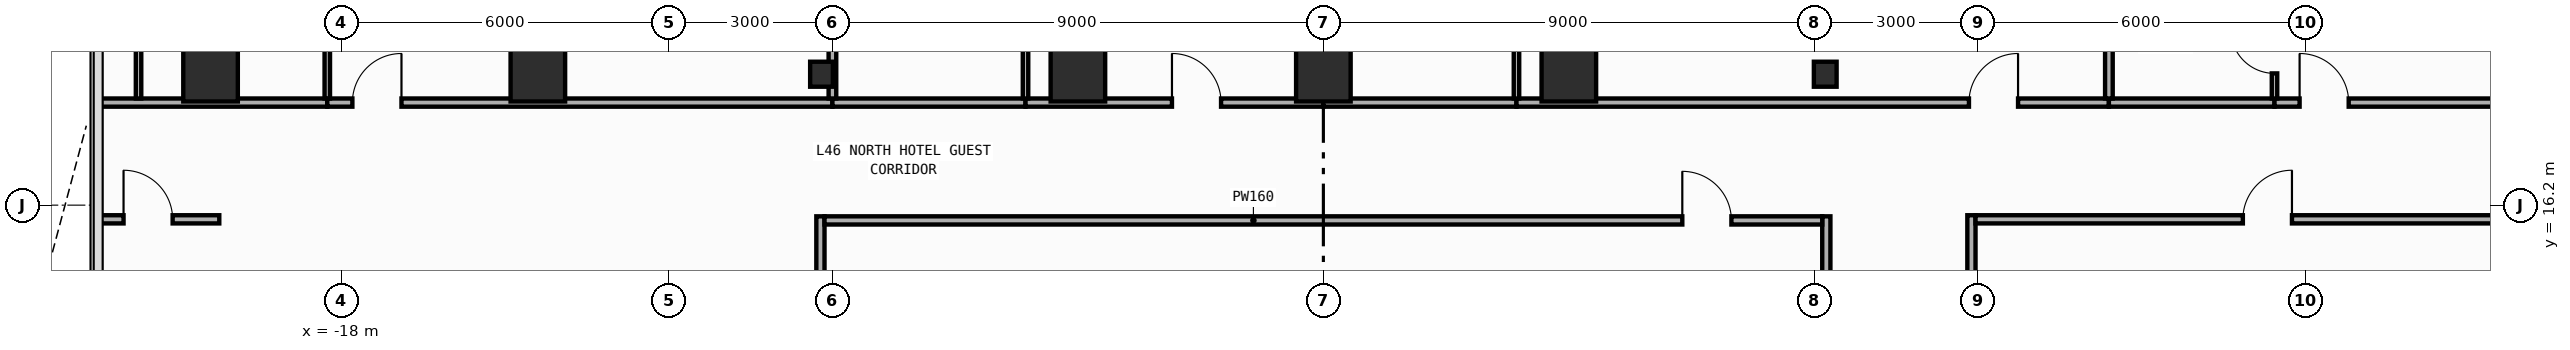
"""IFC4 building model, lengths in metres.
Left out: names, types, materials, properties, quantities, classifications, styles, units other than length and angle.
Written with IfcOpenShell. Run it as: python <this file> out.ifc"""

import sys

from ifc_helpers import new_model, si_unit, direction, frame, frame_2d, origin, origin_2d, place, context, subcontext, project, spatial, rectangle, i_section, extrude, element, fill, save


model = new_model("IFC4")
c1 = context("Model", 3, precision=1e-05, world=origin(), true_north=direction((0.0, 1.0)))
c2 = subcontext(c1, "Body", "Model", "MODEL_VIEW")
j1 = project(units=[si_unit("LENGTHUNIT", "METRE"), si_unit("PLANEANGLEUNIT", "RADIAN")], contexts=[c1])
p1 = place(None, origin())
s1 = spatial("IfcSite", under=j1, at=p1, CompositionType="ELEMENT")
p2 = place(p1, origin())
s2 = spatial("IfcBuilding", under=s1, at=p2, CompositionType="ELEMENT")
p3 = place(p2, frame((0.0, 0.0, 199.2)))
s3 = spatial("IfcBuildingStorey", under=s2, at=p3, CompositionType="ELEMENT", Elevation=199.2)
for number, where, z_axis, x_axis in (
    (1, (-9.2, 18.6, 0.0), (0.0, 0.0, 1.0), (1.0, 0.0, 0.0)),
    (2, (9.2, 18.6, 0.0), (0.0, 0.0, 1.0), (1.0, 0.0, 0.0)),
):
    element("IfcColumn", number, at=place(p3, frame(where, z_axis=z_axis, x_axis=x_axis)), inside=s3, PredefinedType="COLUMN", context=c2, shape_type="SweptSolid", body=[
        extrude(i_section(OverallWidth=0.417, OverallDepth=0.458, WebThickness=0.03, FlangeThickness=0.05, FilletRadius=0.022, at=origin_2d()), origin(), (0.0, 0.0, 1.0), 3.8),
    ])
for number, where, z_axis, x_axis in (
    (3, (-20.4, 18.6, 0.0), (0.0, 0.0, 1.0), (1.0, 0.0, 0.0)),
    (4, (-14.4, 18.6, 0.0), (0.0, 0.0, 1.0), (1.0, 0.0, 0.0)),
    (5, (-4.5, 18.6, 0.0), (0.0, 0.0, 1.0), (1.0, 0.0, 0.0)),
    (6, (0.0, 18.6, 0.0), (0.0, 0.0, 1.0), (1.0, 0.0, 0.0)),
    (7, (4.5, 18.6, 0.0), (0.0, 0.0, 1.0), (1.0, 0.0, 0.0)),
):
    element("IfcColumn", number, at=place(p3, frame(where, z_axis=z_axis, x_axis=x_axis)), inside=s3, PredefinedType="COLUMN", context=c2, shape_type="SweptSolid", body=[
        extrude(rectangle(XDim=1.0, YDim=1.0, at=origin_2d()), origin(), (0.0, 0.0, 1.0), 3.8),
    ])
p4 = place(p3, frame((-9.22, -1.8, 0.0), z_axis=(0.0, 0.0, 1.0), x_axis=(0.0, 1.0, 0.0)))
e8 = element("IfcWall", 8, at=p4, inside=s3, PredefinedType="PARTITIONING", context=c2, shape_type="SweptSolid", body=[
    extrude(rectangle(XDim=17.795, YDim=0.15, at=frame_2d((8.897, 0.0))), origin(), (0.0, 0.0, 1.0), 2.952),
])
p5 = place(p4, frame((6.729, 0.0, 0.0)))
e9 = element("IfcOpeningElement", 9, at=p5, cuts=e8, PredefinedType="OPENING", context=c2, shape_type="SweptSolid", body=[
    extrude(rectangle(XDim=0.9, YDim=2.15, at=frame_2d((0.45, 1.075))), frame((0.0, 0.085, 0.0), z_axis=(0.0, -1.0, 0.0), x_axis=(1.0, 0.0, 0.0)), (0.0, 0.0, 1.0), 0.17),
])
p6 = place(p3, frame((9.22, -1.8, 0.0), z_axis=(0.0, 0.0, 1.0), x_axis=(0.0, 1.0, 0.0)))
e10 = element("IfcWall", 10, at=p6, inside=s3, PredefinedType="PARTITIONING", context=c2, shape_type="SweptSolid", body=[
    extrude(rectangle(XDim=17.795, YDim=0.15, at=frame_2d((8.897, 0.0))), origin(), (0.0, 0.0, 1.0), 2.952),
])
p7 = place(p6, frame((6.729, 0.0, 0.0)))
e11 = element("IfcOpeningElement", 11, at=p7, cuts=e10, PredefinedType="OPENING", context=c2, shape_type="SweptSolid", body=[
    extrude(rectangle(XDim=0.9, YDim=2.15, at=frame_2d((0.45, 1.075))), frame((0.0, 0.085, 0.0), z_axis=(0.0, -1.0, 0.0), x_axis=(1.0, 0.0, 0.0)), (0.0, 0.0, 1.0), 0.17),
])
p8 = place(p3, frame((11.88, 7.16, 0.0), z_axis=(0.0, 0.0, 1.0), x_axis=(0.0, 1.0, 0.0)))
e12 = element("IfcWall", 12, at=p8, inside=s3, PredefinedType="PARTITIONING", context=c2, shape_type="SweptSolid", body=[
    extrude(rectangle(XDim=8.855, YDim=0.15, at=frame_2d((4.427, 0.0))), origin(), (0.0, 0.0, 1.0), 3.54),
])
p9 = place(p8, frame((0.46, 0.0, 0.0)))
e13 = element("IfcOpeningElement", 13, at=p9, cuts=e12, PredefinedType="OPENING", context=c2, shape_type="SweptSolid", body=[
    extrude(rectangle(XDim=0.9, YDim=2.15, at=frame_2d((0.45, 1.075))), frame((0.0, 0.085, 0.0), z_axis=(0.0, -1.0, 0.0), x_axis=(1.0, 0.0, 0.0)), (0.0, 0.0, 1.0), 0.17),
])
p10 = place(p3, frame((-9.145, 15.92, 0.0), z_axis=(0.0, 0.0, 1.0), x_axis=(1.0, 0.0, 0.0)))
e14 = element("IfcWall", 14, at=p10, inside=s3, PredefinedType="PARTITIONING", context=c2, shape_type="SweptSolid", body=[
    extrude(rectangle(XDim=18.29, YDim=0.15, at=frame_2d((9.145, 0.0))), origin(), (0.0, 0.0, 1.0), 3.54),
])
p11 = place(p10, frame((15.725, 0.0, 0.0)))
e15 = element("IfcOpeningElement", 15, at=p11, cuts=e14, PredefinedType="OPENING", context=c2, shape_type="SweptSolid", body=[
    extrude(rectangle(XDim=0.9, YDim=2.15, at=frame_2d((0.45, 1.075))), frame((0.0, 0.085, 0.0), z_axis=(0.0, -1.0, 0.0), x_axis=(1.0, 0.0, 0.0)), (0.0, 0.0, 1.0), 0.17),
])
p12 = place(p3, frame((-22.455, 18.08, 0.0), z_axis=(0.0, 0.0, 1.0), x_axis=(1.0, 0.0, 0.0)))
e16 = element("IfcWall", 16, at=p12, inside=s3, PredefinedType="PARTITIONING", context=c2, shape_type="SweptSolid", body=[
    extrude(rectangle(XDim=4.195, YDim=0.15, at=frame_2d((2.098, 0.0))), origin(), (0.0, 0.0, 1.0), 3.54),
])
p13 = place(p3, frame((-18.26, 18.08, 0.0), z_axis=(0.0, 0.0, 1.0), x_axis=(1.0, 0.0, 0.0)))
e17 = element("IfcWall", 17, at=p13, inside=s3, PredefinedType="PARTITIONING", context=c2, shape_type="SweptSolid", body=[
    extrude(rectangle(XDim=9.26, YDim=0.15, at=frame_2d((4.63, 0.0))), origin(), (0.0, 0.0, 1.0), 3.54),
])
p14 = place(p13, frame((0.46, 0.0, 0.0)))
e18 = element("IfcOpeningElement", 18, at=p14, cuts=e17, PredefinedType="OPENING", context=c2, shape_type="SweptSolid", body=[
    extrude(rectangle(XDim=0.9, YDim=2.15, at=frame_2d((0.45, 1.075))), frame((0.0, 0.085, 0.0), z_axis=(0.0, -1.0, 0.0), x_axis=(1.0, 0.0, 0.0)), (0.0, 0.0, 1.0), 0.17),
])
p15 = place(p3, frame((-9.0, 18.08, 0.0), z_axis=(0.0, 0.0, 1.0), x_axis=(1.0, 0.0, 0.0)))
e19 = element("IfcWall", 19, at=p15, inside=s3, PredefinedType="PARTITIONING", context=c2, shape_type="SweptSolid", body=[
    extrude(rectangle(XDim=3.54, YDim=0.15, at=frame_2d((1.77, 0.0))), origin(), (0.0, 0.0, 1.0), 3.54),
])
p16 = place(p3, frame((-5.46, 18.08, 0.0), z_axis=(0.0, 0.0, 1.0), x_axis=(1.0, 0.0, 0.0)))
e20 = element("IfcWall", 20, at=p16, inside=s3, PredefinedType="PARTITIONING", context=c2, shape_type="SweptSolid", body=[
    extrude(rectangle(XDim=5.46, YDim=0.15, at=frame_2d((2.73, 0.0))), origin(), (0.0, 0.0, 1.0), 3.54),
])
p17 = place(p16, frame((2.684, 0.0, 0.0)))
e21 = element("IfcOpeningElement", 21, at=p17, cuts=e20, PredefinedType="OPENING", context=c2, shape_type="SweptSolid", body=[
    extrude(rectangle(XDim=0.9, YDim=2.15, at=frame_2d((0.45, 1.075))), frame((0.0, 0.085, 0.0), z_axis=(0.0, -1.0, 0.0), x_axis=(1.0, 0.0, 0.0)), (0.0, 0.0, 1.0), 0.17),
])
p18 = place(p3, frame((0.0, 18.08, 0.0), z_axis=(0.0, 0.0, 1.0), x_axis=(1.0, 0.0, 0.0)))
e22 = element("IfcWall", 22, at=p18, inside=s3, PredefinedType="PARTITIONING", context=c2, shape_type="SweptSolid", body=[
    extrude(rectangle(XDim=3.54, YDim=0.15, at=frame_2d((1.77, 0.0))), origin(), (0.0, 0.0, 1.0), 3.54),
])
p19 = place(p3, frame((3.54, 18.08, 0.0), z_axis=(0.0, 0.0, 1.0), x_axis=(1.0, 0.0, 0.0)))
e23 = element("IfcWall", 23, at=p19, inside=s3, PredefinedType="PARTITIONING", context=c2, shape_type="SweptSolid", body=[
    extrude(rectangle(XDim=10.86, YDim=0.15, at=frame_2d((5.43, 0.0))), origin(), (0.0, 0.0, 1.0), 3.54),
])
p20 = place(p19, frame((8.295, 0.0, 0.0)))
e24 = element("IfcOpeningElement", 24, at=p20, cuts=e23, PredefinedType="OPENING", context=c2, shape_type="SweptSolid", body=[
    extrude(rectangle(XDim=0.9, YDim=2.15, at=frame_2d((0.45, 1.075))), frame((0.0, 0.085, 0.0), z_axis=(0.0, -1.0, 0.0), x_axis=(1.0, 0.0, 0.0)), (0.0, 0.0, 1.0), 0.17),
])
p21 = place(p3, frame((14.4, 18.08, 0.0), z_axis=(0.0, 0.0, 1.0), x_axis=(1.0, 0.0, 0.0)))
e25 = element("IfcWall", 25, at=p21, inside=s3, PredefinedType="PARTITIONING", context=c2, shape_type="SweptSolid", body=[
    extrude(rectangle(XDim=3.036, YDim=0.15, at=frame_2d((1.518, 0.0))), origin(), (0.0, 0.0, 1.0), 3.54),
])
p22 = place(p3, frame((17.436, 18.08, 0.0), z_axis=(0.0, 0.0, 1.0), x_axis=(1.0, 0.0, 0.0)))
e26 = element("IfcWall", 26, at=p22, inside=s3, PredefinedType="PARTITIONING", context=c2, shape_type="SweptSolid", body=[
    extrude(rectangle(XDim=5.019, YDim=0.15, at=frame_2d((2.51, 0.0))), origin(), (0.0, 0.0, 1.0), 3.54),
])
p23 = place(p22, frame((0.46, 0.0, 0.0)))
e27 = element("IfcOpeningElement", 27, at=p23, cuts=e26, PredefinedType="OPENING", context=c2, shape_type="SweptSolid", body=[
    extrude(rectangle(XDim=0.9, YDim=2.15, at=frame_2d((0.45, 1.075))), frame((0.0, 0.085, 0.0), z_axis=(0.0, -1.0, 0.0), x_axis=(1.0, 0.0, 0.0)), (0.0, 0.0, 1.0), 0.17),
])
p24 = place(p3, frame((11.955, 15.94, 0.0), z_axis=(0.0, 0.0, 1.0), x_axis=(1.0, 0.0, 0.0)))
e28 = element("IfcWall", 28, at=p24, inside=s3, PredefinedType="PARTITIONING", context=c2, shape_type="SweptSolid", body=[
    extrude(rectangle(XDim=10.5, YDim=0.15, at=frame_2d((5.25, 0.0))), origin(), (0.0, 0.0, 1.0), 3.54),
])
p25 = place(p24, frame((4.901, 0.0, 0.0)))
e29 = element("IfcOpeningElement", 29, at=p25, cuts=e28, PredefinedType="OPENING", context=c2, shape_type="SweptSolid", body=[
    extrude(rectangle(XDim=0.9, YDim=2.15, at=frame_2d((0.45, 1.075))), frame((0.0, 0.085, 0.0), z_axis=(0.0, -1.0, 0.0), x_axis=(1.0, 0.0, 0.0)), (0.0, 0.0, 1.0), 0.17),
])
p26 = place(p3, frame((-22.455, 15.94, 0.0), z_axis=(0.0, 0.0, 1.0), x_axis=(1.0, 0.0, 0.0)))
e30 = element("IfcWall", 30, at=p26, inside=s3, PredefinedType="PARTITIONING", context=c2, shape_type="SweptSolid", body=[
    extrude(rectangle(XDim=2.215, YDim=0.15, at=frame_2d((1.107, 0.0))), origin(), (0.0, 0.0, 1.0), 3.54),
])
p27 = place(p26, frame((0.46, 0.0, 0.0)))
e31 = element("IfcOpeningElement", 31, at=p27, cuts=e30, PredefinedType="OPENING", context=c2, shape_type="SweptSolid", body=[
    extrude(rectangle(XDim=0.9, YDim=2.15, at=frame_2d((0.45, 1.075))), frame((0.0, 0.085, 0.0), z_axis=(0.0, -1.0, 0.0), x_axis=(1.0, 0.0, 0.0)), (0.0, 0.0, 1.0), 0.17),
])
p28 = place(p3, frame((-18.26, 18.155, 0.0), z_axis=(0.0, 0.0, 1.0), x_axis=(0.0, 1.0, 0.0)))
e32 = element("IfcWall", 32, at=p28, inside=s3, PredefinedType="PARTITIONING", context=c2, shape_type="SweptSolid", body=[
    extrude(rectangle(XDim=2.965, YDim=0.1, at=frame_2d((1.482, 0.0))), origin(), (0.0, 0.0, 1.0), 3.54),
])
p29 = place(p28, frame((1.705, 0.0, 0.0)))
e33 = element("IfcOpeningElement", 33, at=p29, cuts=e32, PredefinedType="OPENING", context=c2, shape_type="SweptSolid", body=[
    extrude(rectangle(XDim=0.8, YDim=2.1, at=frame_2d((0.4, 1.05))), frame((0.0, 0.06, 0.0), z_axis=(0.0, -1.0, 0.0), x_axis=(1.0, 0.0, 0.0)), (0.0, 0.0, 1.0), 0.12),
])
p30 = place(p3, frame((-9.0, 18.155, 0.0), z_axis=(0.0, 0.0, 1.0), x_axis=(0.0, 1.0, 0.0)))
e34 = element("IfcWall", 34, at=p30, inside=s3, PredefinedType="PARTITIONING", context=c2, shape_type="SweptSolid", body=[
    extrude(rectangle(XDim=3.015, YDim=0.14, at=frame_2d((1.507, 0.0))), origin(), (0.0, 0.0, 1.0), 2.952),
])
p31 = place(p3, frame((-5.46, 18.155, 0.0), z_axis=(0.0, 0.0, 1.0), x_axis=(0.0, 1.0, 0.0)))
e35 = element("IfcWall", 35, at=p31, inside=s3, PredefinedType="PARTITIONING", context=c2, shape_type="SweptSolid", body=[
    extrude(rectangle(XDim=2.965, YDim=0.1, at=frame_2d((1.482, 0.0))), origin(), (0.0, 0.0, 1.0), 3.54),
])
p32 = place(p31, frame((1.705, 0.0, 0.0)))
e36 = element("IfcOpeningElement", 36, at=p32, cuts=e35, PredefinedType="OPENING", context=c2, shape_type="SweptSolid", body=[
    extrude(rectangle(XDim=0.8, YDim=2.1, at=frame_2d((0.4, 1.05))), frame((0.0, 0.06, 0.0), z_axis=(0.0, -1.0, 0.0), x_axis=(1.0, 0.0, 0.0)), (0.0, 0.0, 1.0), 0.12),
])
p33 = place(p3, frame((0.0, 18.155, 0.0), z_axis=(0.0, 0.0, 1.0), x_axis=(0.0, 1.0, 0.0)))
e37 = element("IfcWall", 37, at=p33, inside=s3, PredefinedType="PARTITIONING", context=c2, shape_type="SweptSolid", body=[
    extrude(rectangle(XDim=3.015, YDim=0.14, at=frame_2d((1.507, 0.0))), origin(), (0.0, 0.0, 1.0), 3.54),
])
p34 = place(p3, frame((3.54, 18.155, 0.0), z_axis=(0.0, 0.0, 1.0), x_axis=(0.0, 1.0, 0.0)))
e38 = element("IfcWall", 38, at=p34, inside=s3, PredefinedType="PARTITIONING", context=c2, shape_type="SweptSolid", body=[
    extrude(rectangle(XDim=2.965, YDim=0.1, at=frame_2d((1.482, 0.0))), origin(), (0.0, 0.0, 1.0), 3.54),
])
p35 = place(p34, frame((1.705, 0.0, 0.0)))
e39 = element("IfcOpeningElement", 39, at=p35, cuts=e38, PredefinedType="OPENING", context=c2, shape_type="SweptSolid", body=[
    extrude(rectangle(XDim=0.8, YDim=2.1, at=frame_2d((0.4, 1.05))), frame((0.0, 0.06, 0.0), z_axis=(0.0, -1.0, 0.0), x_axis=(1.0, 0.0, 0.0)), (0.0, 0.0, 1.0), 0.12),
])
p36 = place(p3, frame((14.4, 18.155, 0.0), z_axis=(0.0, 0.0, 1.0), x_axis=(0.0, 1.0, 0.0)))
e40 = element("IfcWall", 40, at=p36, inside=s3, PredefinedType="PARTITIONING", context=c2, shape_type="SweptSolid", body=[
    extrude(rectangle(XDim=3.015, YDim=0.14, at=frame_2d((1.507, 0.0))), origin(), (0.0, 0.0, 1.0), 2.952),
])
p37 = place(p3, frame((17.436, 18.155, 0.0), z_axis=(0.0, 0.0, 1.0), x_axis=(0.0, 1.0, 0.0)))
e41 = element("IfcWall", 41, at=p37, inside=s3, PredefinedType="PARTITIONING", context=c2, shape_type="SweptSolid", body=[
    extrude(rectangle(XDim=2.965, YDim=0.1, at=frame_2d((1.482, 0.0))), origin(), (0.0, 0.0, 1.0), 3.54),
])
p38 = place(p37, frame((0.46, 0.0, 0.0)))
e42 = element("IfcOpeningElement", 42, at=p38, cuts=e41, PredefinedType="OPENING", context=c2, shape_type="SweptSolid", body=[
    extrude(rectangle(XDim=0.8, YDim=2.1, at=frame_2d((0.4, 1.05))), frame((0.0, 0.06, 0.0), z_axis=(0.0, -1.0, 0.0), x_axis=(1.0, 0.0, 0.0)), (0.0, 0.0, 1.0), 0.12),
])
p39 = place(p3, frame((-21.72, 18.155, 0.0), z_axis=(0.0, 0.0, 1.0), x_axis=(0.0, 1.0, 0.0)))
e43 = element("IfcWall", 43, at=p39, inside=s3, PredefinedType="PARTITIONING", context=c2, shape_type="SweptSolid", body=[
    extrude(rectangle(XDim=2.965, YDim=0.1, at=frame_2d((1.482, 0.0))), origin(), (0.0, 0.0, 1.0), 3.54),
])
p40 = place(p11, origin())
e44 = element("IfcDoor", 44, at=p40, inside=s3, OperationType="SINGLE_SWING_LEFT", PredefinedType="DOOR", context=c2, shape_type="SweptSolid", body=[
    extrude(rectangle(XDim=0.9, YDim=2.15, at=frame_2d((0.45, 1.075))), frame((0.0, 0.025, 0.0), z_axis=(0.0, -1.0, 0.0), x_axis=(1.0, 0.0, 0.0)), (0.0, 0.0, 1.0), 0.05),
])
fill(e15, e44)
p41 = place(p14, origin())
e45 = element("IfcDoor", 45, at=p41, inside=s3, OperationType="SINGLE_SWING_RIGHT", PredefinedType="DOOR", context=c2, shape_type="SweptSolid", body=[
    extrude(rectangle(XDim=0.9, YDim=2.15, at=frame_2d((0.45, 1.075))), frame((0.0, 0.025, 0.0), z_axis=(0.0, -1.0, 0.0), x_axis=(1.0, 0.0, 0.0)), (0.0, 0.0, 1.0), 0.05),
])
fill(e18, e45)
p42 = place(p17, origin())
e46 = element("IfcDoor", 46, at=p42, inside=s3, OperationType="SINGLE_SWING_LEFT", PredefinedType="DOOR", context=c2, shape_type="SweptSolid", body=[
    extrude(rectangle(XDim=0.9, YDim=2.15, at=frame_2d((0.45, 1.075))), frame((0.0, 0.025, 0.0), z_axis=(0.0, -1.0, 0.0), x_axis=(1.0, 0.0, 0.0)), (0.0, 0.0, 1.0), 0.05),
])
fill(e21, e46)
p43 = place(p20, origin())
e47 = element("IfcDoor", 47, at=p43, inside=s3, OperationType="SINGLE_SWING_RIGHT", PredefinedType="DOOR", context=c2, shape_type="SweptSolid", body=[
    extrude(rectangle(XDim=0.9, YDim=2.15, at=frame_2d((0.45, 1.075))), frame((0.0, 0.025, 0.0), z_axis=(0.0, -1.0, 0.0), x_axis=(1.0, 0.0, 0.0)), (0.0, 0.0, 1.0), 0.05),
])
fill(e24, e47)
p44 = place(p23, origin())
e48 = element("IfcDoor", 48, at=p44, inside=s3, OperationType="SINGLE_SWING_LEFT", PredefinedType="DOOR", context=c2, shape_type="SweptSolid", body=[
    extrude(rectangle(XDim=0.9, YDim=2.15, at=frame_2d((0.45, 1.075))), frame((0.0, 0.025, 0.0), z_axis=(0.0, -1.0, 0.0), x_axis=(1.0, 0.0, 0.0)), (0.0, 0.0, 1.0), 0.05),
])
fill(e27, e48)
p45 = place(p25, origin())
e49 = element("IfcDoor", 49, at=p45, inside=s3, OperationType="SINGLE_SWING_RIGHT", PredefinedType="DOOR", context=c2, shape_type="SweptSolid", body=[
    extrude(rectangle(XDim=0.9, YDim=2.15, at=frame_2d((0.45, 1.075))), frame((0.0, 0.025, 0.0), z_axis=(0.0, -1.0, 0.0), x_axis=(1.0, 0.0, 0.0)), (0.0, 0.0, 1.0), 0.05),
])
fill(e29, e49)
p46 = place(p27, origin())
e50 = element("IfcDoor", 50, at=p46, inside=s3, OperationType="SINGLE_SWING_LEFT", PredefinedType="DOOR", context=c2, shape_type="SweptSolid", body=[
    extrude(rectangle(XDim=0.9, YDim=2.15, at=frame_2d((0.45, 1.075))), frame((0.0, 0.025, 0.0), z_axis=(0.0, -1.0, 0.0), x_axis=(1.0, 0.0, 0.0)), (0.0, 0.0, 1.0), 0.05),
])
fill(e31, e50)
p47 = place(p38, origin())
e51 = element("IfcDoor", 51, at=p47, inside=s3, OperationType="SINGLE_SWING_RIGHT", PredefinedType="DOOR", context=c2, shape_type="SweptSolid", body=[
    extrude(rectangle(XDim=0.8, YDim=2.1, at=frame_2d((0.4, 1.05))), frame((0.0, 0.025, 0.0), z_axis=(0.0, -1.0, 0.0), x_axis=(1.0, 0.0, 0.0)), (0.0, 0.0, 1.0), 0.05),
])
fill(e42, e51)
save(model, sys.argv[1])
